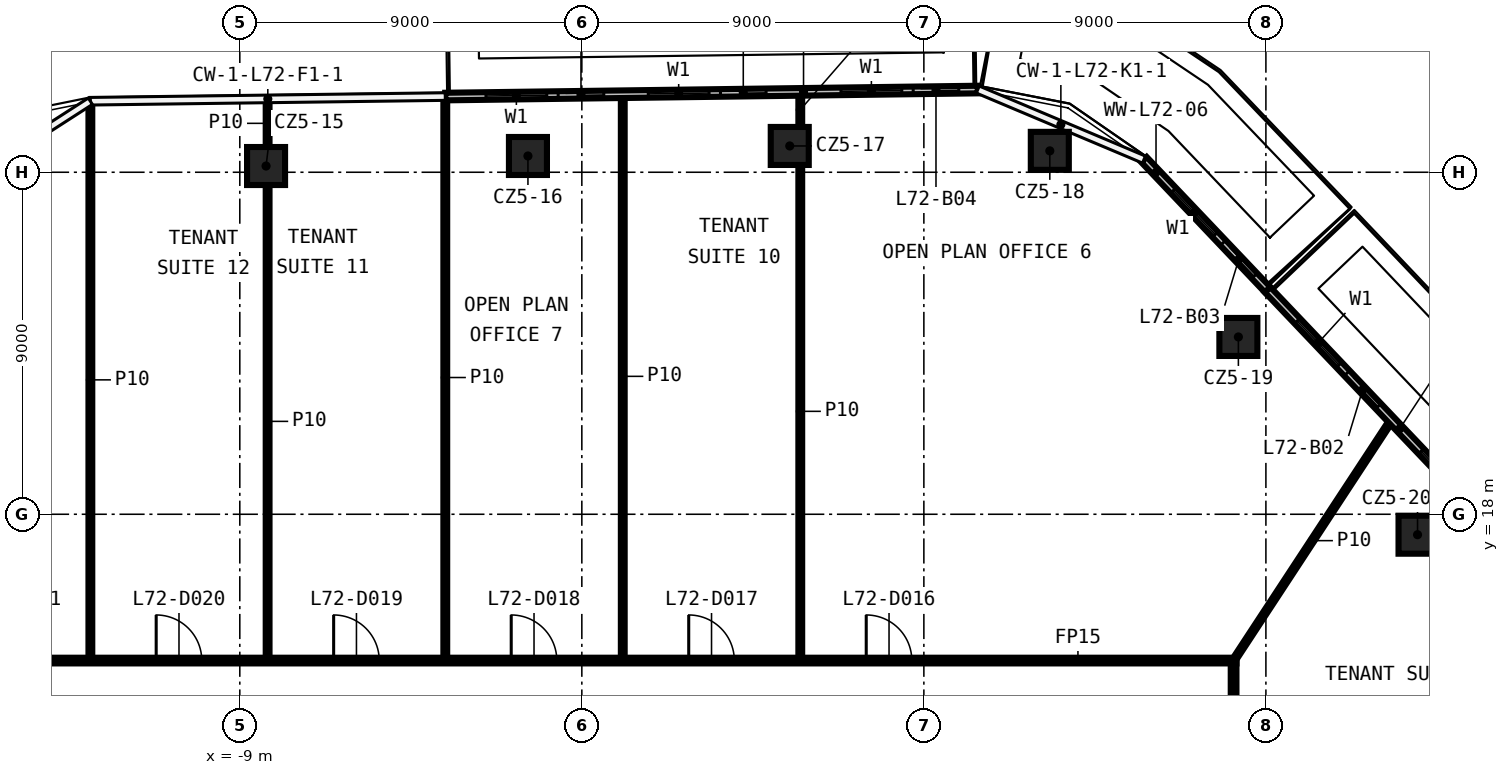
"""IFC4 building model, lengths in metres.
Left out: names, types, materials, properties, quantities, classifications, styles, units other than length and angle.
Written with IfcOpenShell. Run it as: python <this file> out.ifc"""

import sys

from ifc_helpers import new_model, si_unit, direction, frame, frame_2d, origin, origin_2d, place, context, subcontext, project, spatial, rectangle, extrude, element, fill, save


model = new_model("IFC4")
c1 = context("Model", 3, precision=1e-05, world=origin(), true_north=direction((0.0, 1.0)))
c2 = subcontext(c1, "Body", "Model", "MODEL_VIEW")
j1 = project(units=[si_unit("LENGTHUNIT", "METRE"), si_unit("PLANEANGLEUNIT", "RADIAN")], contexts=[c1])
p1 = place(None, origin())
s1 = spatial("IfcSite", under=j1, at=p1, CompositionType="ELEMENT")
p2 = place(p1, origin())
s2 = spatial("IfcBuilding", under=s1, at=p2, CompositionType="ELEMENT")
p3 = place(p2, frame((0.0, 0.0, 336.2)))
s3 = spatial("IfcBuildingStorey", under=s2, at=p3, CompositionType="ELEMENT", Elevation=336.2)
for number, where, z_axis, x_axis in (
    (1, (-8.309, 27.164, 0.0), (0.0, 0.0, 1.0), (1.0, 0.0, 0.0)),
    (2, (-1.418, 27.428, 0.0), (0.0, 0.0, 1.0), (1.0, 0.0, 0.0)),
    (3, (5.471, 27.692, 0.0), (0.0, 0.0, 1.0), (1.0, 0.0, 0.0)),
    (4, (12.314, 27.563, 0.0), (0.0, 0.0, 1.0), (1.0, 0.0, 0.0)),
    (5, (17.276, 22.666, 0.0), (0.0, 0.0, 1.0), (1.0, 0.0, 0.0)),
    (6, (21.99, 17.462, 0.0), (0.0, 0.0, 1.0), (1.0, 0.0, 0.0)),
):
    element("IfcColumn", number, at=place(p3, frame(where, z_axis=z_axis, x_axis=x_axis)), inside=s3, PredefinedType="COLUMN", context=c2, shape_type="SweptSolid", body=[
        extrude(rectangle(XDim=1.0, YDim=1.0, at=origin_2d()), origin(), (0.0, 0.0, 1.0), 3.82),
    ])
p4 = place(p3, frame((-17.225, 14.15, 0.0), z_axis=(0.0, 0.0, 1.0), x_axis=(1.0, 0.0, 0.0)))
e7 = element("IfcWall", 7, at=p4, inside=s3, PredefinedType="PARTITIONING", context=c2, shape_type="SweptSolid", body=[
    extrude(rectangle(XDim=34.45, YDim=0.15, at=frame_2d((17.225, 0.0))), origin(), (0.0, 0.0, 1.0), 3.82),
])
p5 = place(p4, frame((24.708, 0.0, 0.0)))
e8 = element("IfcOpeningElement", 8, at=p5, cuts=e7, PredefinedType="OPENING", context=c2, shape_type="SweptSolid", body=[
    extrude(rectangle(XDim=1.2, YDim=2.1, at=frame_2d((0.6, 1.05))), frame((0.0, 0.085, 0.0), z_axis=(0.0, -1.0, 0.0), x_axis=(1.0, 0.0, 0.0)), (0.0, 0.0, 1.0), 0.17),
])
p6 = place(p4, frame((20.038, 0.0, 0.0)))
e9 = element("IfcOpeningElement", 9, at=p6, cuts=e7, PredefinedType="OPENING", context=c2, shape_type="SweptSolid", body=[
    extrude(rectangle(XDim=1.2, YDim=2.1, at=frame_2d((0.6, 1.05))), frame((0.0, 0.085, 0.0), z_axis=(0.0, -1.0, 0.0), x_axis=(1.0, 0.0, 0.0)), (0.0, 0.0, 1.0), 0.17),
])
p7 = place(p4, frame((15.367, 0.0, 0.0)))
e10 = element("IfcOpeningElement", 10, at=p7, cuts=e7, PredefinedType="OPENING", context=c2, shape_type="SweptSolid", body=[
    extrude(rectangle(XDim=1.2, YDim=2.1, at=frame_2d((0.6, 1.05))), frame((0.0, 0.085, 0.0), z_axis=(0.0, -1.0, 0.0), x_axis=(1.0, 0.0, 0.0)), (0.0, 0.0, 1.0), 0.17),
])
p8 = place(p4, frame((10.695, 0.0, 0.0)))
e11 = element("IfcOpeningElement", 11, at=p8, cuts=e7, PredefinedType="OPENING", context=c2, shape_type="SweptSolid", body=[
    extrude(rectangle(XDim=1.2, YDim=2.1, at=frame_2d((0.6, 1.05))), frame((0.0, 0.085, 0.0), z_axis=(0.0, -1.0, 0.0), x_axis=(1.0, 0.0, 0.0)), (0.0, 0.0, 1.0), 0.17),
])
p9 = place(p4, frame((6.025, 0.0, 0.0)))
e12 = element("IfcOpeningElement", 12, at=p9, cuts=e7, PredefinedType="OPENING", context=c2, shape_type="SweptSolid", body=[
    extrude(rectangle(XDim=1.2, YDim=2.1, at=frame_2d((0.6, 1.05))), frame((0.0, 0.085, 0.0), z_axis=(0.0, -1.0, 0.0), x_axis=(1.0, 0.0, 0.0)), (0.0, 0.0, 1.0), 0.17),
])
p10 = place(p4, frame((1.698, 0.0, 0.0)))
e13 = element("IfcOpeningElement", 13, at=p10, cuts=e7, PredefinedType="OPENING", context=c2, shape_type="SweptSolid", body=[
    extrude(rectangle(XDim=1.2, YDim=2.1, at=frame_2d((0.6, 1.05))), frame((0.0, 0.085, 0.0), z_axis=(0.0, -1.0, 0.0), x_axis=(1.0, 0.0, 0.0)), (0.0, 0.0, 1.0), 0.17),
])
p11 = place(p3, frame((17.15, 14.15, 0.0), z_axis=(0.0, 0.0, 1.0), x_axis=(0.548731307267, 0.835998775373, 0.0)))
e14 = element("IfcWall", 14, at=p11, inside=s3, PredefinedType="PARTITIONING", context=c2, shape_type="SweptSolid", body=[
    extrude(rectangle(XDim=7.55, YDim=0.1, at=frame_2d((3.775, 0.0))), origin(), (0.0, 0.0, 1.0), 3.82),
])
p12 = place(p3, frame((17.15, 14.075, 0.0), z_axis=(0.0, 0.0, 1.0), x_axis=(0.0, -1.0, 0.0)))
e15 = element("IfcWall", 15, at=p12, inside=s3, PredefinedType="PARTITIONING", context=c2, shape_type="SweptSolid", body=[
    extrude(rectangle(XDim=28.15, YDim=0.15, at=frame_2d((14.075, 0.0))), origin(), (0.0, 0.0, 1.0), 3.82),
])
p13 = place(p12, frame((24.339, 0.0, 0.0)))
e16 = element("IfcOpeningElement", 16, at=p13, cuts=e15, PredefinedType="OPENING", context=c2, shape_type="SweptSolid", body=[
    extrude(rectangle(XDim=1.2, YDim=2.1, at=frame_2d((0.6, 1.05))), frame((0.0, 0.085, 0.0), z_axis=(0.0, -1.0, 0.0), x_axis=(1.0, 0.0, 0.0)), (0.0, 0.0, 1.0), 0.17),
])
p14 = place(p12, frame((20.227, 0.0, 0.0)))
e17 = element("IfcOpeningElement", 17, at=p14, cuts=e15, PredefinedType="OPENING", context=c2, shape_type="SweptSolid", body=[
    extrude(rectangle(XDim=1.2, YDim=2.1, at=frame_2d((0.6, 1.05))), frame((0.0, 0.085, 0.0), z_axis=(0.0, -1.0, 0.0), x_axis=(1.0, 0.0, 0.0)), (0.0, 0.0, 1.0), 0.17),
])
p15 = place(p12, frame((16.115, 0.0, 0.0)))
e18 = element("IfcOpeningElement", 18, at=p15, cuts=e15, PredefinedType="OPENING", context=c2, shape_type="SweptSolid", body=[
    extrude(rectangle(XDim=1.2, YDim=2.1, at=frame_2d((0.6, 1.05))), frame((0.0, 0.085, 0.0), z_axis=(0.0, -1.0, 0.0), x_axis=(1.0, 0.0, 0.0)), (0.0, 0.0, 1.0), 0.17),
])
p16 = place(p12, frame((12.006, 0.0, 0.0)))
e19 = element("IfcOpeningElement", 19, at=p16, cuts=e15, PredefinedType="OPENING", context=c2, shape_type="SweptSolid", body=[
    extrude(rectangle(XDim=1.2, YDim=2.1, at=frame_2d((0.6, 1.05))), frame((0.0, 0.085, 0.0), z_axis=(0.0, -1.0, 0.0), x_axis=(1.0, 0.0, 0.0)), (0.0, 0.0, 1.0), 0.17),
])
p17 = place(p12, frame((5.464, 0.0, 0.0)))
e20 = element("IfcOpeningElement", 20, at=p17, cuts=e15, PredefinedType="OPENING", context=c2, shape_type="SweptSolid", body=[
    extrude(rectangle(XDim=1.2, YDim=2.1, at=frame_2d((0.6, 1.05))), frame((0.0, 0.085, 0.0), z_axis=(0.0, -1.0, 0.0), x_axis=(1.0, 0.0, 0.0)), (0.0, 0.0, 1.0), 0.17),
])
p18 = place(p12, frame((1.569, 0.0, 0.0)))
e21 = element("IfcOpeningElement", 21, at=p18, cuts=e15, PredefinedType="OPENING", context=c2, shape_type="SweptSolid", body=[
    extrude(rectangle(XDim=1.2, YDim=2.1, at=frame_2d((0.6, 1.05))), frame((0.0, 0.085, 0.0), z_axis=(0.0, -1.0, 0.0), x_axis=(1.0, 0.0, 0.0)), (0.0, 0.0, 1.0), 0.17),
])
p19 = place(p3, frame((5.748, 14.225, 0.0), z_axis=(0.0, 0.0, 1.0), x_axis=(0.0, 1.0, 0.0)))
e22 = element("IfcWall", 22, at=p19, inside=s3, PredefinedType="PARTITIONING", context=c2, shape_type="SweptSolid", body=[
    extrude(rectangle(XDim=12.967, YDim=0.1, at=frame_2d((6.483, 0.0))), origin(), (0.0, 0.0, 1.0), 3.82),
])
p20 = place(p3, frame((5.748, 28.192, 0.0), z_axis=(0.0, 0.0, 1.0), x_axis=(0.0, 1.0, 0.0)))
e23 = element("IfcWall", 23, at=p20, inside=s3, PredefinedType="PARTITIONING", context=c2, shape_type="SweptSolid", body=[
    extrude(rectangle(XDim=0.903, YDim=0.1, at=frame_2d((0.452, 0.0))), origin(), (0.0, 0.0, 1.0), 3.82),
])
p21 = place(p3, frame((1.077, 14.225, 0.0), z_axis=(0.0, 0.0, 1.0), x_axis=(0.0, 1.0, 0.0)))
e24 = element("IfcWall", 24, at=p21, inside=s3, PredefinedType="PARTITIONING", context=c2, shape_type="SweptSolid", body=[
    extrude(rectangle(XDim=14.808, YDim=0.1, at=frame_2d((7.404, 0.0))), origin(), (0.0, 0.0, 1.0), 3.82),
])
p22 = place(p3, frame((-3.593, 14.225, 0.0), z_axis=(0.0, 0.0, 1.0), x_axis=(0.0, 1.0, 0.0)))
e25 = element("IfcWall", 25, at=p22, inside=s3, PredefinedType="PARTITIONING", context=c2, shape_type="SweptSolid", body=[
    extrude(rectangle(XDim=14.747, YDim=0.1, at=frame_2d((7.374, 0.0))), origin(), (0.0, 0.0, 1.0), 3.82),
])
p23 = place(p3, frame((-8.268, 14.225, 0.0), z_axis=(0.0, 0.0, 1.0), x_axis=(0.0, 1.0, 0.0)))
e26 = element("IfcWall", 26, at=p23, inside=s3, PredefinedType="PARTITIONING", context=c2, shape_type="SweptSolid", body=[
    extrude(rectangle(XDim=12.439, YDim=0.1, at=frame_2d((6.219, 0.0))), origin(), (0.0, 0.0, 1.0), 3.82),
])
p24 = place(p3, frame((-8.268, 27.664, 0.0), z_axis=(0.0, 0.0, 1.0), x_axis=(0.0, 1.0, 0.0)))
e27 = element("IfcWall", 27, at=p24, inside=s3, PredefinedType="PARTITIONING", context=c2, shape_type="SweptSolid", body=[
    extrude(rectangle(XDim=1.246, YDim=0.1, at=frame_2d((0.623, 0.0))), origin(), (0.0, 0.0, 1.0), 3.82),
])
p25 = place(p3, frame((-12.932, 14.225, 0.0), z_axis=(0.0, 0.0, 1.0), x_axis=(0.0, 1.0, 0.0)))
e28 = element("IfcWall", 28, at=p25, inside=s3, PredefinedType="PARTITIONING", context=c2, shape_type="SweptSolid", body=[
    extrude(rectangle(XDim=14.624, YDim=0.1, at=frame_2d((7.312, 0.0))), origin(), (0.0, 0.0, 1.0), 3.82),
])
p26 = place(p3, frame((24.563, 17.049, 0.0), z_axis=(0.0, 0.0, 1.0), x_axis=(-0.688807081371, 0.724944690755, 0.0)))
e29 = element("IfcWall", 29, at=p26, inside=s3, PredefinedType="SOLIDWALL", context=c2, shape_type="SweptSolid", body=[
    extrude(rectangle(XDim=9.465, YDim=0.2, at=frame_2d((4.732, 0.0))), origin(), (0.0, 0.0, 1.0), 3.82),
])
p27 = place(p26, frame((2.0, 0.0, 0.6)))
e30 = element("IfcOpeningElement", 30, at=p27, cuts=e29, PredefinedType="OPENING", context=c2, shape_type="SweptSolid", body=[
    extrude(rectangle(XDim=1.6, YDim=2.4, at=frame_2d((0.8, 1.2))), frame((0.0, 0.11, 0.0), z_axis=(0.0, -1.0, 0.0), x_axis=(1.0, 0.0, 0.0)), (0.0, 0.0, 1.0), 0.22),
])
p28 = place(p26, frame((0.3, 0.0, 0.0)))
e31 = element("IfcOpeningElement", 31, at=p28, cuts=e29, PredefinedType="OPENING", context=c2, shape_type="SweptSolid", body=[
    extrude(rectangle(XDim=1.2, YDim=2.4, at=frame_2d((0.6, 1.2))), frame((0.0, 0.11, 0.0), z_axis=(0.0, -1.0, 0.0), x_axis=(1.0, 0.0, 0.0)), (0.0, 0.0, 1.0), 0.22),
])
p29 = place(p26, frame((6.733, 0.0, 0.6)))
e32 = element("IfcOpeningElement", 32, at=p29, cuts=e29, PredefinedType="OPENING", context=c2, shape_type="SweptSolid", body=[
    extrude(rectangle(XDim=1.6, YDim=2.4, at=frame_2d((0.8, 1.2))), frame((0.0, 0.11, 0.0), z_axis=(0.0, -1.0, 0.0), x_axis=(1.0, 0.0, 0.0)), (0.0, 0.0, 1.0), 0.22),
])
p30 = place(p26, frame((5.233, 0.0, 0.0)))
e33 = element("IfcOpeningElement", 33, at=p30, cuts=e29, PredefinedType="OPENING", context=c2, shape_type="SweptSolid", body=[
    extrude(rectangle(XDim=1.2, YDim=2.4, at=frame_2d((0.6, 1.2))), frame((0.0, 0.11, 0.0), z_axis=(0.0, -1.0, 0.0), x_axis=(1.0, 0.0, 0.0)), (0.0, 0.0, 1.0), 0.22),
])
p31 = place(p3, frame((18.044, 23.91, 0.0), z_axis=(0.0, 0.0, 1.0), x_axis=(-0.688806527413, 0.724945217098, 0.0)))
e34 = element("IfcWall", 34, at=p31, inside=s3, PredefinedType="SOLIDWALL", context=c2, shape_type="SweptSolid", body=[
    extrude(rectangle(XDim=4.722, YDim=0.2, at=frame_2d((2.361, 0.0))), origin(), (0.0, 0.0, 1.0), 3.82),
])
p32 = place(p31, frame((2.0, 0.0, 0.6)))
e35 = element("IfcOpeningElement", 35, at=p32, cuts=e34, PredefinedType="OPENING", context=c2, shape_type="SweptSolid", body=[
    extrude(rectangle(XDim=1.6, YDim=2.4, at=frame_2d((0.8, 1.2))), frame((0.0, 0.11, 0.0), z_axis=(0.0, -1.0, 0.0), x_axis=(1.0, 0.0, 0.0)), (0.0, 0.0, 1.0), 0.22),
])
p33 = place(p31, frame((0.5, 0.0, 0.0)))
e36 = element("IfcOpeningElement", 36, at=p33, cuts=e34, PredefinedType="OPENING", context=c2, shape_type="SweptSolid", body=[
    extrude(rectangle(XDim=1.2, YDim=2.4, at=frame_2d((0.6, 1.2))), frame((0.0, 0.11, 0.0), z_axis=(0.0, -1.0, 0.0), x_axis=(1.0, 0.0, 0.0)), (0.0, 0.0, 1.0), 0.22),
])
p34 = place(p3, frame((10.419, 29.177, 0.0), z_axis=(0.0, 0.0, 1.0), x_axis=(-0.999913262087, -0.013170736582, 0.0)))
e37 = element("IfcWall", 37, at=p34, inside=s3, PredefinedType="SOLIDWALL", context=c2, shape_type="SweptSolid", body=[
    extrude(rectangle(XDim=14.014, YDim=0.2, at=frame_2d((7.007, 0.0))), origin(), (0.0, 0.0, 1.0), 3.82),
])
p35 = place(p34, frame((2.0, 0.0, 0.6)))
e38 = element("IfcOpeningElement", 38, at=p35, cuts=e37, PredefinedType="OPENING", context=c2, shape_type="SweptSolid", body=[
    extrude(rectangle(XDim=1.6, YDim=2.4, at=frame_2d((0.8, 1.2))), frame((0.0, 0.11, 0.0), z_axis=(0.0, -1.0, 0.0), x_axis=(1.0, 0.0, 0.0)), (0.0, 0.0, 1.0), 0.22),
])
p36 = place(p34, frame((0.5, 0.0, 0.0)))
e39 = element("IfcOpeningElement", 39, at=p36, cuts=e37, PredefinedType="OPENING", context=c2, shape_type="SweptSolid", body=[
    extrude(rectangle(XDim=1.2, YDim=2.4, at=frame_2d((0.6, 1.2))), frame((0.0, 0.11, 0.0), z_axis=(0.0, -1.0, 0.0), x_axis=(1.0, 0.0, 0.0)), (0.0, 0.0, 1.0), 0.22),
])
p37 = place(p34, frame((7.071, 0.0, 0.6)))
e40 = element("IfcOpeningElement", 40, at=p37, cuts=e37, PredefinedType="OPENING", context=c2, shape_type="SweptSolid", body=[
    extrude(rectangle(XDim=1.6, YDim=2.4, at=frame_2d((0.8, 1.2))), frame((0.0, 0.11, 0.0), z_axis=(0.0, -1.0, 0.0), x_axis=(1.0, 0.0, 0.0)), (0.0, 0.0, 1.0), 0.22),
])
p38 = place(p34, frame((5.571, 0.0, 0.0)))
e41 = element("IfcOpeningElement", 41, at=p38, cuts=e37, PredefinedType="OPENING", context=c2, shape_type="SweptSolid", body=[
    extrude(rectangle(XDim=1.2, YDim=2.4, at=frame_2d((0.6, 1.2))), frame((0.0, 0.11, 0.0), z_axis=(0.0, -1.0, 0.0), x_axis=(1.0, 0.0, 0.0)), (0.0, 0.0, 1.0), 0.22),
])
p39 = place(p34, frame((11.342, 0.0, 0.6)))
e42 = element("IfcOpeningElement", 42, at=p39, cuts=e37, PredefinedType="OPENING", context=c2, shape_type="SweptSolid", body=[
    extrude(rectangle(XDim=1.6, YDim=2.4, at=frame_2d((0.8, 1.2))), frame((0.0, 0.11, 0.0), z_axis=(0.0, -1.0, 0.0), x_axis=(1.0, 0.0, 0.0)), (0.0, 0.0, 1.0), 0.22),
])
p40 = place(p34, frame((9.842, 0.0, 0.0)))
e43 = element("IfcOpeningElement", 43, at=p40, cuts=e37, PredefinedType="OPENING", context=c2, shape_type="SweptSolid", body=[
    extrude(rectangle(XDim=1.2, YDim=2.4, at=frame_2d((0.6, 1.2))), frame((0.0, 0.11, 0.0), z_axis=(0.0, -1.0, 0.0), x_axis=(1.0, 0.0, 0.0)), (0.0, 0.0, 1.0), 0.22),
])
p41 = place(p5, origin())
e44 = element("IfcDoor", 44, at=p41, inside=s3, OperationType="SINGLE_SWING_LEFT", PredefinedType="DOOR", context=c2, shape_type="SweptSolid", body=[
    extrude(rectangle(XDim=1.2, YDim=2.1, at=frame_2d((0.6, 1.05))), frame((0.0, 0.025, 0.0), z_axis=(0.0, -1.0, 0.0), x_axis=(1.0, 0.0, 0.0)), (0.0, 0.0, 1.0), 0.05),
])
fill(e8, e44)
p42 = place(p6, origin())
e45 = element("IfcDoor", 45, at=p42, inside=s3, OperationType="SINGLE_SWING_RIGHT", PredefinedType="DOOR", context=c2, shape_type="SweptSolid", body=[
    extrude(rectangle(XDim=1.2, YDim=2.1, at=frame_2d((0.6, 1.05))), frame((0.0, 0.025, 0.0), z_axis=(0.0, -1.0, 0.0), x_axis=(1.0, 0.0, 0.0)), (0.0, 0.0, 1.0), 0.05),
])
fill(e9, e45)
p43 = place(p7, origin())
e46 = element("IfcDoor", 46, at=p43, inside=s3, OperationType="SINGLE_SWING_LEFT", PredefinedType="DOOR", context=c2, shape_type="SweptSolid", body=[
    extrude(rectangle(XDim=1.2, YDim=2.1, at=frame_2d((0.6, 1.05))), frame((0.0, 0.025, 0.0), z_axis=(0.0, -1.0, 0.0), x_axis=(1.0, 0.0, 0.0)), (0.0, 0.0, 1.0), 0.05),
])
fill(e10, e46)
p44 = place(p8, origin())
e47 = element("IfcDoor", 47, at=p44, inside=s3, OperationType="SINGLE_SWING_RIGHT", PredefinedType="DOOR", context=c2, shape_type="SweptSolid", body=[
    extrude(rectangle(XDim=1.2, YDim=2.1, at=frame_2d((0.6, 1.05))), frame((0.0, 0.025, 0.0), z_axis=(0.0, -1.0, 0.0), x_axis=(1.0, 0.0, 0.0)), (0.0, 0.0, 1.0), 0.05),
])
fill(e11, e47)
p45 = place(p9, origin())
e48 = element("IfcDoor", 48, at=p45, inside=s3, OperationType="SINGLE_SWING_LEFT", PredefinedType="DOOR", context=c2, shape_type="SweptSolid", body=[
    extrude(rectangle(XDim=1.2, YDim=2.1, at=frame_2d((0.6, 1.05))), frame((0.0, 0.025, 0.0), z_axis=(0.0, -1.0, 0.0), x_axis=(1.0, 0.0, 0.0)), (0.0, 0.0, 1.0), 0.05),
])
fill(e12, e48)
p46 = place(p27, origin())
e49 = element("IfcWindow", 49, at=p46, inside=s3, PartitioningType="SINGLE_PANEL", PredefinedType="WINDOW", context=c2, shape_type="SweptSolid", body=[
    extrude(rectangle(XDim=1.6, YDim=2.4, at=frame_2d((0.8, 1.2))), frame((0.0, 0.03, 0.0), z_axis=(0.0, -1.0, 0.0), x_axis=(1.0, 0.0, 0.0)), (0.0, 0.0, 1.0), 0.06),
])
fill(e30, e49)
p47 = place(p29, origin())
e50 = element("IfcWindow", 50, at=p47, inside=s3, PartitioningType="SINGLE_PANEL", PredefinedType="WINDOW", context=c2, shape_type="SweptSolid", body=[
    extrude(rectangle(XDim=1.6, YDim=2.4, at=frame_2d((0.8, 1.2))), frame((0.0, 0.03, 0.0), z_axis=(0.0, -1.0, 0.0), x_axis=(1.0, 0.0, 0.0)), (0.0, 0.0, 1.0), 0.06),
])
fill(e32, e50)
p48 = place(p30, origin())
e51 = element("IfcDoor", 51, at=p48, inside=s3, OperationType="SLIDING_TO_LEFT", PredefinedType="DOOR", context=c2, shape_type="SweptSolid", body=[
    extrude(rectangle(XDim=1.2, YDim=2.4, at=frame_2d((0.6, 1.2))), frame((0.0, 0.025, 0.0), z_axis=(0.0, -1.0, 0.0), x_axis=(1.0, 0.0, 0.0)), (0.0, 0.0, 1.0), 0.05),
])
fill(e33, e51)
p49 = place(p32, origin())
e52 = element("IfcWindow", 52, at=p49, inside=s3, PartitioningType="SINGLE_PANEL", PredefinedType="WINDOW", context=c2, shape_type="SweptSolid", body=[
    extrude(rectangle(XDim=1.6, YDim=2.4, at=frame_2d((0.8, 1.2))), frame((0.0, 0.03, 0.0), z_axis=(0.0, -1.0, 0.0), x_axis=(1.0, 0.0, 0.0)), (0.0, 0.0, 1.0), 0.06),
])
fill(e35, e52)
p50 = place(p33, origin())
e53 = element("IfcDoor", 53, at=p50, inside=s3, OperationType="SLIDING_TO_LEFT", PredefinedType="DOOR", context=c2, shape_type="SweptSolid", body=[
    extrude(rectangle(XDim=1.2, YDim=2.4, at=frame_2d((0.6, 1.2))), frame((0.0, 0.025, 0.0), z_axis=(0.0, -1.0, 0.0), x_axis=(1.0, 0.0, 0.0)), (0.0, 0.0, 1.0), 0.05),
])
fill(e36, e53)
p51 = place(p35, origin())
e54 = element("IfcWindow", 54, at=p51, inside=s3, PartitioningType="SINGLE_PANEL", PredefinedType="WINDOW", context=c2, shape_type="SweptSolid", body=[
    extrude(rectangle(XDim=1.6, YDim=2.4, at=frame_2d((0.8, 1.2))), frame((0.0, 0.03, 0.0), z_axis=(0.0, -1.0, 0.0), x_axis=(1.0, 0.0, 0.0)), (0.0, 0.0, 1.0), 0.06),
])
fill(e38, e54)
p52 = place(p36, origin())
e55 = element("IfcDoor", 55, at=p52, inside=s3, OperationType="SLIDING_TO_LEFT", PredefinedType="DOOR", context=c2, shape_type="SweptSolid", body=[
    extrude(rectangle(XDim=1.2, YDim=2.4, at=frame_2d((0.6, 1.2))), frame((0.0, 0.025, 0.0), z_axis=(0.0, -1.0, 0.0), x_axis=(1.0, 0.0, 0.0)), (0.0, 0.0, 1.0), 0.05),
])
fill(e39, e55)
p53 = place(p37, origin())
e56 = element("IfcWindow", 56, at=p53, inside=s3, PartitioningType="SINGLE_PANEL", PredefinedType="WINDOW", context=c2, shape_type="SweptSolid", body=[
    extrude(rectangle(XDim=1.6, YDim=2.4, at=frame_2d((0.8, 1.2))), frame((0.0, 0.03, 0.0), z_axis=(0.0, -1.0, 0.0), x_axis=(1.0, 0.0, 0.0)), (0.0, 0.0, 1.0), 0.06),
])
fill(e40, e56)
p54 = place(p38, origin())
e57 = element("IfcDoor", 57, at=p54, inside=s3, OperationType="SLIDING_TO_LEFT", PredefinedType="DOOR", context=c2, shape_type="SweptSolid", body=[
    extrude(rectangle(XDim=1.2, YDim=2.4, at=frame_2d((0.6, 1.2))), frame((0.0, 0.025, 0.0), z_axis=(0.0, -1.0, 0.0), x_axis=(1.0, 0.0, 0.0)), (0.0, 0.0, 1.0), 0.05),
])
fill(e41, e57)
p55 = place(p39, origin())
e58 = element("IfcWindow", 58, at=p55, inside=s3, PartitioningType="SINGLE_PANEL", PredefinedType="WINDOW", context=c2, shape_type="SweptSolid", body=[
    extrude(rectangle(XDim=1.6, YDim=2.4, at=frame_2d((0.8, 1.2))), frame((0.0, 0.03, 0.0), z_axis=(0.0, -1.0, 0.0), x_axis=(1.0, 0.0, 0.0)), (0.0, 0.0, 1.0), 0.06),
])
fill(e42, e58)
p56 = place(p40, origin())
e59 = element("IfcDoor", 59, at=p56, inside=s3, OperationType="SLIDING_TO_LEFT", PredefinedType="DOOR", context=c2, shape_type="SweptSolid", body=[
    extrude(rectangle(XDim=1.2, YDim=2.4, at=frame_2d((0.6, 1.2))), frame((0.0, 0.025, 0.0), z_axis=(0.0, -1.0, 0.0), x_axis=(1.0, 0.0, 0.0)), (0.0, 0.0, 1.0), 0.05),
])
fill(e43, e59)
save(model, sys.argv[1])
